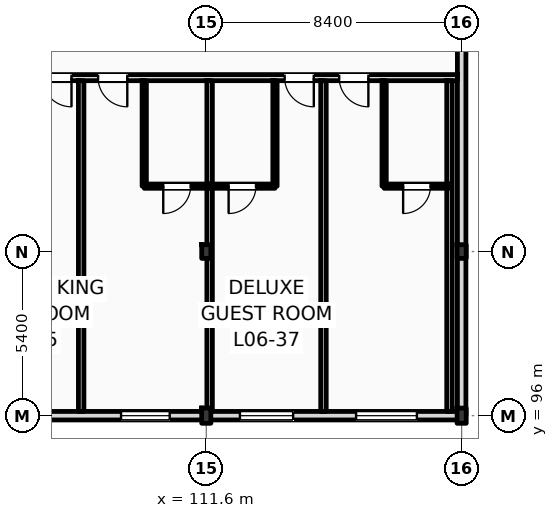
"""IFC4 building model, lengths in metres.
Left out: names, types, materials, properties, quantities, classifications, styles, units other than length and angle.
Written with IfcOpenShell. Run it as: python <this file> out.ifc"""

import sys

from ifc_helpers import new_model, si_unit, direction, frame, frame_2d, origin, origin_2d, place, context, subcontext, project, spatial, rectangle, i_section, extrude, element, fill, save


model = new_model("IFC4")
c1 = context("Model", 3, precision=1e-05, world=origin(), true_north=direction((0.0, 1.0)))
c2 = subcontext(c1, "Body", "Model", "MODEL_VIEW")
j1 = project(units=[si_unit("LENGTHUNIT", "METRE"), si_unit("PLANEANGLEUNIT", "RADIAN")], contexts=[c1])
p1 = place(None, origin())
s1 = spatial("IfcSite", under=j1, at=p1, CompositionType="ELEMENT")
p2 = place(p1, origin())
s2 = spatial("IfcBuilding", under=s1, at=p2, CompositionType="ELEMENT")
p3 = place(p2, frame((0.0, 0.0, 28.2)))
s3 = spatial("IfcBuildingStorey", under=s2, at=p3, CompositionType="ELEMENT", Elevation=28.2)
p4 = place(p3, frame((111.6, 96.0, 0.0), z_axis=(0.0, 0.0, 1.0), x_axis=(1.0, 0.0, 0.0)))
e1 = element("IfcColumn", 1, at=p4, inside=s3, PredefinedType="COLUMN", context=c2, shape_type="SweptSolid", body=[
    extrude(i_section(OverallWidth=0.3, OverallDepth=0.5, WebThickness=0.014, FlangeThickness=0.028, FilletRadius=0.027, at=origin_2d()), origin(), (0.0, 0.0, 1.0), 3.6),
])
p5 = place(p3, frame((111.6, 101.4, 0.0), z_axis=(0.0, 0.0, 1.0), x_axis=(1.0, 0.0, 0.0)))
e2 = element("IfcColumn", 2, at=p5, inside=s3, PredefinedType="COLUMN", context=c2, shape_type="SweptSolid", body=[
    extrude(i_section(OverallWidth=0.3, OverallDepth=0.45, WebThickness=0.014, FlangeThickness=0.026, FilletRadius=0.027, at=origin_2d()), origin(), (0.0, 0.0, 1.0), 3.6),
])
p6 = place(p3, frame((120.0, 96.0, 0.0), z_axis=(0.0, 0.0, 1.0), x_axis=(1.0, 0.0, 0.0)))
e3 = element("IfcColumn", 3, at=p6, inside=s3, PredefinedType="COLUMN", context=c2, shape_type="SweptSolid", body=[
    extrude(i_section(OverallWidth=0.3, OverallDepth=0.5, WebThickness=0.014, FlangeThickness=0.028, FilletRadius=0.027, at=origin_2d()), origin(), (0.0, 0.0, 1.0), 3.6),
])
p7 = place(p3, frame((120.0, 101.4, 0.0), z_axis=(0.0, 0.0, 1.0), x_axis=(1.0, 0.0, 0.0)))
e4 = element("IfcColumn", 4, at=p7, inside=s3, PredefinedType="COLUMN", context=c2, shape_type="SweptSolid", body=[
    extrude(i_section(OverallWidth=0.3, OverallDepth=0.45, WebThickness=0.014, FlangeThickness=0.026, FilletRadius=0.027, at=origin_2d()), origin(), (0.0, 0.0, 1.0), 3.6),
])
p8 = place(p3, frame((120.0, 96.0, 0.0), z_axis=(0.0, 0.0, 1.0), x_axis=(0.0, 1.0, 0.0)))
e5 = element("IfcWall", 5, at=p8, inside=s3, PredefinedType="STANDARD", context=c2, shape_type="SweptSolid", body=[
    extrude(rectangle(XDim=22.0, YDim=0.28, at=frame_2d((11.0, 0.0))), origin(), (0.0, 0.0, 1.0), 2.99),
])
p9 = place(p3, frame((25.2, 96.0, 0.0), z_axis=(0.0, 0.0, 1.0), x_axis=(1.0, 0.0, 0.0)))
e6 = element("IfcWall", 6, at=p9, inside=s3, PredefinedType="STANDARD", context=c2, shape_type="SweptSolid", body=[
    extrude(rectangle(XDim=94.8, YDim=0.28, at=frame_2d((47.4, 0.0))), origin(), (0.0, 0.0, 1.0), 2.8),
])
p10 = place(p9, frame((16.454, 0.0, 0.9)))
e7 = element("IfcOpeningElement", 7, at=p10, cuts=e6, PredefinedType="OPENING", context=c2, shape_type="SweptSolid", body=[
    extrude(rectangle(XDim=2.7, YDim=1.72, at=frame_2d((1.35, 0.86))), frame((0.0, 0.15, 0.0), z_axis=(0.0, -1.0, 0.0), x_axis=(1.0, 0.0, 0.0)), (0.0, 0.0, 1.0), 0.3),
])
p11 = place(p9, frame((20.068, 0.0, 0.9)))
e8 = element("IfcOpeningElement", 8, at=p11, cuts=e6, PredefinedType="OPENING", context=c2, shape_type="SweptSolid", body=[
    extrude(rectangle(XDim=2.389, YDim=1.72, at=frame_2d((1.194, 0.86))), frame((0.0, 0.15, 0.0), z_axis=(0.0, -1.0, 0.0), x_axis=(1.0, 0.0, 0.0)), (0.0, 0.0, 1.0), 0.3),
])
p12 = place(p9, frame((24.277, 0.0, 0.9)))
e9 = element("IfcOpeningElement", 9, at=p12, cuts=e6, PredefinedType="OPENING", context=c2, shape_type="SweptSolid", body=[
    extrude(rectangle(XDim=1.8, YDim=1.72, at=frame_2d((0.9, 0.86))), frame((0.0, 0.15, 0.0), z_axis=(0.0, -1.0, 0.0), x_axis=(1.0, 0.0, 0.0)), (0.0, 0.0, 1.0), 0.3),
])
p13 = place(p9, frame((27.885, 0.0, 0.9)))
e10 = element("IfcOpeningElement", 10, at=p13, cuts=e6, PredefinedType="OPENING", context=c2, shape_type="SweptSolid", body=[
    extrude(rectangle(XDim=2.388, YDim=1.72, at=frame_2d((1.194, 0.86))), frame((0.0, 0.15, 0.0), z_axis=(0.0, -1.0, 0.0), x_axis=(1.0, 0.0, 0.0)), (0.0, 0.0, 1.0), 0.3),
])
p14 = place(p9, frame((32.093, 0.0, 0.9)))
e11 = element("IfcOpeningElement", 11, at=p14, cuts=e6, PredefinedType="OPENING", context=c2, shape_type="SweptSolid", body=[
    extrude(rectangle(XDim=1.8, YDim=1.72, at=frame_2d((0.9, 0.86))), frame((0.0, 0.15, 0.0), z_axis=(0.0, -1.0, 0.0), x_axis=(1.0, 0.0, 0.0)), (0.0, 0.0, 1.0), 0.3),
])
p15 = place(p9, frame((35.702, 0.0, 0.9)))
e12 = element("IfcOpeningElement", 12, at=p15, cuts=e6, PredefinedType="OPENING", context=c2, shape_type="SweptSolid", body=[
    extrude(rectangle(XDim=2.488, YDim=1.72, at=frame_2d((1.244, 0.86))), frame((0.0, 0.15, 0.0), z_axis=(0.0, -1.0, 0.0), x_axis=(1.0, 0.0, 0.0)), (0.0, 0.0, 1.0), 0.3),
])
p16 = place(p9, frame((55.56, 0.0, 0.9)))
e13 = element("IfcOpeningElement", 13, at=p16, cuts=e6, PredefinedType="OPENING", context=c2, shape_type="SweptSolid", body=[
    extrude(rectangle(XDim=1.8, YDim=1.72, at=frame_2d((0.9, 0.86))), frame((0.0, 0.15, 0.0), z_axis=(0.0, -1.0, 0.0), x_axis=(1.0, 0.0, 0.0)), (0.0, 0.0, 1.0), 0.3),
])
p17 = place(p9, frame((58.985, 0.0, 0.9)))
e14 = element("IfcOpeningElement", 14, at=p17, cuts=e6, PredefinedType="OPENING", context=c2, shape_type="SweptSolid", body=[
    extrude(rectangle(XDim=1.8, YDim=1.72, at=frame_2d((0.9, 0.86))), frame((0.0, 0.15, 0.0), z_axis=(0.0, -1.0, 0.0), x_axis=(1.0, 0.0, 0.0)), (0.0, 0.0, 1.0), 0.3),
])
p18 = place(p9, frame((63.21, 0.0, 0.9)))
e15 = element("IfcOpeningElement", 15, at=p18, cuts=e6, PredefinedType="OPENING", context=c2, shape_type="SweptSolid", body=[
    extrude(rectangle(XDim=2.525, YDim=1.72, at=frame_2d((1.262, 0.86))), frame((0.0, 0.15, 0.0), z_axis=(0.0, -1.0, 0.0), x_axis=(1.0, 0.0, 0.0)), (0.0, 0.0, 1.0), 0.3),
])
p19 = place(p9, frame((66.955, 0.0, 0.9)))
e16 = element("IfcOpeningElement", 16, at=p19, cuts=e6, PredefinedType="OPENING", context=c2, shape_type="SweptSolid", body=[
    extrude(rectangle(XDim=1.8, YDim=1.72, at=frame_2d((0.9, 0.86))), frame((0.0, 0.15, 0.0), z_axis=(0.0, -1.0, 0.0), x_axis=(1.0, 0.0, 0.0)), (0.0, 0.0, 1.0), 0.3),
])
p20 = place(p9, frame((71.892, 0.0, 0.9)))
e17 = element("IfcOpeningElement", 17, at=p20, cuts=e6, PredefinedType="OPENING", context=c2, shape_type="SweptSolid", body=[
    extrude(rectangle(XDim=1.1, YDim=1.5, at=frame_2d((0.55, 0.75))), frame((0.0, 0.15, 0.0), z_axis=(0.0, -1.0, 0.0), x_axis=(1.0, 0.0, 0.0)), (0.0, 0.0, 1.0), 0.3),
])
p21 = place(p9, frame((75.802, 0.0, 0.9)))
e18 = element("IfcOpeningElement", 18, at=p21, cuts=e6, PredefinedType="OPENING", context=c2, shape_type="SweptSolid", body=[
    extrude(rectangle(XDim=1.25, YDim=1.6, at=frame_2d((0.625, 0.8))), frame((0.0, 0.15, 0.0), z_axis=(0.0, -1.0, 0.0), x_axis=(1.0, 0.0, 0.0)), (0.0, 0.0, 1.0), 0.3),
])
p22 = place(p9, frame((79.712, 0.0, 0.9)))
e19 = element("IfcOpeningElement", 19, at=p22, cuts=e6, PredefinedType="OPENING", context=c2, shape_type="SweptSolid", body=[
    extrude(rectangle(XDim=1.4, YDim=1.7, at=frame_2d((0.7, 0.85))), frame((0.0, 0.15, 0.0), z_axis=(0.0, -1.0, 0.0), x_axis=(1.0, 0.0, 0.0)), (0.0, 0.0, 1.0), 0.3),
])
p23 = place(p9, frame((83.597, 0.0, 0.9)))
e20 = element("IfcOpeningElement", 20, at=p23, cuts=e6, PredefinedType="OPENING", context=c2, shape_type="SweptSolid", body=[
    extrude(rectangle(XDim=1.6, YDim=1.72, at=frame_2d((0.8, 0.86))), frame((0.0, 0.15, 0.0), z_axis=(0.0, -1.0, 0.0), x_axis=(1.0, 0.0, 0.0)), (0.0, 0.0, 1.0), 0.3),
])
p24 = place(p9, frame((87.507, 0.0, 0.9)))
e21 = element("IfcOpeningElement", 21, at=p24, cuts=e6, PredefinedType="OPENING", context=c2, shape_type="SweptSolid", body=[
    extrude(rectangle(XDim=1.75, YDim=1.72, at=frame_2d((0.875, 0.86))), frame((0.0, 0.15, 0.0), z_axis=(0.0, -1.0, 0.0), x_axis=(1.0, 0.0, 0.0)), (0.0, 0.0, 1.0), 0.3),
])
p25 = place(p9, frame((91.328, 0.0, 0.9)))
e22 = element("IfcOpeningElement", 22, at=p25, cuts=e6, PredefinedType="OPENING", context=c2, shape_type="SweptSolid", body=[
    extrude(rectangle(XDim=2.0, YDim=1.72, at=frame_2d((1.0, 0.86))), frame((0.0, 0.15, 0.0), z_axis=(0.0, -1.0, 0.0), x_axis=(1.0, 0.0, 0.0)), (0.0, 0.0, 1.0), 0.3),
])
p26 = place(p3, frame((79.76, 107.12, 0.0), z_axis=(0.0, 0.0, 1.0), x_axis=(1.0, 0.0, 0.0)))
e23 = element("IfcWall", 23, at=p26, inside=s3, PredefinedType="PARTITIONING", context=c2, shape_type="SweptSolid", body=[
    extrude(rectangle(XDim=40.1, YDim=0.2, at=frame_2d((20.05, 0.0))), origin(), (0.0, 0.0, 1.0), 3.36),
])
p27 = place(p26, frame((2.497, 0.0, 0.0)))
e24 = element("IfcOpeningElement", 24, at=p27, cuts=e23, PredefinedType="OPENING", context=c2, shape_type="SweptSolid", body=[
    extrude(rectangle(XDim=0.96, YDim=2.2, at=frame_2d((0.48, 1.1))), frame((0.0, 0.11, 0.0), z_axis=(0.0, -1.0, 0.0), x_axis=(1.0, 0.0, 0.0)), (0.0, 0.0, 1.0), 0.22),
])
p28 = place(p26, frame((4.372, 0.0, 0.0)))
e25 = element("IfcOpeningElement", 25, at=p28, cuts=e23, PredefinedType="OPENING", context=c2, shape_type="SweptSolid", body=[
    extrude(rectangle(XDim=0.96, YDim=2.2, at=frame_2d((0.48, 1.1))), frame((0.0, 0.11, 0.0), z_axis=(0.0, -1.0, 0.0), x_axis=(1.0, 0.0, 0.0)), (0.0, 0.0, 1.0), 0.22),
])
p29 = place(p26, frame((10.507, 0.0, 0.0)))
e26 = element("IfcOpeningElement", 26, at=p29, cuts=e23, PredefinedType="OPENING", context=c2, shape_type="SweptSolid", body=[
    extrude(rectangle(XDim=0.96, YDim=2.2, at=frame_2d((0.48, 1.1))), frame((0.0, 0.11, 0.0), z_axis=(0.0, -1.0, 0.0), x_axis=(1.0, 0.0, 0.0)), (0.0, 0.0, 1.0), 0.22),
])
p30 = place(p26, frame((12.342, 0.0, 0.0)))
e27 = element("IfcOpeningElement", 27, at=p30, cuts=e23, PredefinedType="OPENING", context=c2, shape_type="SweptSolid", body=[
    extrude(rectangle(XDim=0.96, YDim=2.2, at=frame_2d((0.48, 1.1))), frame((0.0, 0.11, 0.0), z_axis=(0.0, -1.0, 0.0), x_axis=(1.0, 0.0, 0.0)), (0.0, 0.0, 1.0), 0.22),
])
p31 = place(p26, frame((18.477, 0.0, 0.0)))
e28 = element("IfcOpeningElement", 28, at=p31, cuts=e23, PredefinedType="OPENING", context=c2, shape_type="SweptSolid", body=[
    extrude(rectangle(XDim=0.96, YDim=2.2, at=frame_2d((0.48, 1.1))), frame((0.0, 0.11, 0.0), z_axis=(0.0, -1.0, 0.0), x_axis=(1.0, 0.0, 0.0)), (0.0, 0.0, 1.0), 0.22),
])
p32 = place(p26, frame((20.312, 0.0, 0.0)))
e29 = element("IfcOpeningElement", 29, at=p32, cuts=e23, PredefinedType="OPENING", context=c2, shape_type="SweptSolid", body=[
    extrude(rectangle(XDim=0.96, YDim=2.2, at=frame_2d((0.48, 1.1))), frame((0.0, 0.11, 0.0), z_axis=(0.0, -1.0, 0.0), x_axis=(1.0, 0.0, 0.0)), (0.0, 0.0, 1.0), 0.22),
])
p33 = place(p26, frame((26.447, 0.0, 0.0)))
e30 = element("IfcOpeningElement", 30, at=p33, cuts=e23, PredefinedType="OPENING", context=c2, shape_type="SweptSolid", body=[
    extrude(rectangle(XDim=0.96, YDim=2.2, at=frame_2d((0.48, 1.1))), frame((0.0, 0.11, 0.0), z_axis=(0.0, -1.0, 0.0), x_axis=(1.0, 0.0, 0.0)), (0.0, 0.0, 1.0), 0.22),
])
p34 = place(p26, frame((28.282, 0.0, 0.0)))
e31 = element("IfcOpeningElement", 31, at=p34, cuts=e23, PredefinedType="OPENING", context=c2, shape_type="SweptSolid", body=[
    extrude(rectangle(XDim=0.96, YDim=2.2, at=frame_2d((0.48, 1.1))), frame((0.0, 0.11, 0.0), z_axis=(0.0, -1.0, 0.0), x_axis=(1.0, 0.0, 0.0)), (0.0, 0.0, 1.0), 0.22),
])
p35 = place(p26, frame((34.417, 0.0, 0.0)))
e32 = element("IfcOpeningElement", 32, at=p35, cuts=e23, PredefinedType="OPENING", context=c2, shape_type="SweptSolid", body=[
    extrude(rectangle(XDim=0.96, YDim=2.2, at=frame_2d((0.48, 1.1))), frame((0.0, 0.11, 0.0), z_axis=(0.0, -1.0, 0.0), x_axis=(1.0, 0.0, 0.0)), (0.0, 0.0, 1.0), 0.22),
])
p36 = place(p26, frame((36.212, 0.0, 0.0)))
e33 = element("IfcOpeningElement", 33, at=p36, cuts=e23, PredefinedType="OPENING", context=c2, shape_type="SweptSolid", body=[
    extrude(rectangle(XDim=0.96, YDim=2.2, at=frame_2d((0.48, 1.1))), frame((0.0, 0.11, 0.0), z_axis=(0.0, -1.0, 0.0), x_axis=(1.0, 0.0, 0.0)), (0.0, 0.0, 1.0), 0.22),
])
p37 = place(p3, frame((107.485, 96.14, 0.0), z_axis=(0.0, 0.0, 1.0), x_axis=(0.0, 1.0, 0.0)))
e34 = element("IfcWall", 34, at=p37, inside=s3, PredefinedType="PARTITIONING", context=c2, shape_type="SweptSolid", body=[
    extrude(rectangle(XDim=10.88, YDim=0.18, at=frame_2d((5.44, 0.0))), origin(), (0.0, 0.0, 1.0), 3.36),
])
p38 = place(p3, frame((111.71, 96.14, 0.0), z_axis=(0.0, 0.0, 1.0), x_axis=(0.0, 1.0, 0.0)))
e35 = element("IfcWall", 35, at=p38, inside=s3, PredefinedType="PARTITIONING", context=c2, shape_type="SweptSolid", body=[
    extrude(rectangle(XDim=10.88, YDim=0.18, at=frame_2d((5.44, 0.0))), origin(), (0.0, 0.0, 1.0), 2.99),
])
p39 = place(p3, frame((109.56, 103.55, 0.0), z_axis=(0.0, 0.0, 1.0), x_axis=(0.0, 1.0, 0.0)))
e36 = element("IfcWall", 36, at=p39, inside=s3, PredefinedType="PARTITIONING", context=c2, shape_type="SweptSolid", body=[
    extrude(rectangle(XDim=3.47, YDim=0.14, at=frame_2d((1.735, 0.0))), origin(), (0.0, 0.0, 1.0), 3.36),
])
p40 = place(p3, frame((109.56, 103.55, 0.0), z_axis=(0.0, 0.0, 1.0), x_axis=(1.0, 0.0, 0.0)))
e37 = element("IfcWall", 37, at=p40, inside=s3, PredefinedType="PARTITIONING", context=c2, shape_type="SweptSolid", body=[
    extrude(rectangle(XDim=2.15, YDim=0.14, at=frame_2d((1.075, 0.0))), origin(), (0.0, 0.0, 1.0), 3.36),
])
p41 = place(p40, frame((0.625, 0.0, 0.0)))
e38 = element("IfcOpeningElement", 38, at=p41, cuts=e37, PredefinedType="OPENING", context=c2, shape_type="SweptSolid", body=[
    extrude(rectangle(XDim=0.9, YDim=2.1, at=frame_2d((0.45, 1.05))), frame((0.0, 0.08, 0.0), z_axis=(0.0, -1.0, 0.0), x_axis=(1.0, 0.0, 0.0)), (0.0, 0.0, 1.0), 0.16),
])
p42 = place(p3, frame((115.455, 96.14, 0.0), z_axis=(0.0, 0.0, 1.0), x_axis=(0.0, 1.0, 0.0)))
e39 = element("IfcWall", 39, at=p42, inside=s3, PredefinedType="PARTITIONING", context=c2, shape_type="SweptSolid", body=[
    extrude(rectangle(XDim=10.88, YDim=0.18, at=frame_2d((5.44, 0.0))), origin(), (0.0, 0.0, 1.0), 3.36),
])
p43 = place(p3, frame((113.86, 103.55, 0.0), z_axis=(0.0, 0.0, 1.0), x_axis=(0.0, 1.0, 0.0)))
e40 = element("IfcWall", 40, at=p43, inside=s3, PredefinedType="PARTITIONING", context=c2, shape_type="SweptSolid", body=[
    extrude(rectangle(XDim=3.47, YDim=0.14, at=frame_2d((1.735, 0.0))), origin(), (0.0, 0.0, 1.0), 3.36),
])
p44 = place(p3, frame((111.71, 103.55, 0.0), z_axis=(0.0, 0.0, 1.0), x_axis=(1.0, 0.0, 0.0)))
e41 = element("IfcWall", 41, at=p44, inside=s3, PredefinedType="PARTITIONING", context=c2, shape_type="SweptSolid", body=[
    extrude(rectangle(XDim=2.15, YDim=0.14, at=frame_2d((1.075, 0.0))), origin(), (0.0, 0.0, 1.0), 3.36),
])
p45 = place(p44, frame((0.625, 0.0, 0.0)))
e42 = element("IfcOpeningElement", 42, at=p45, cuts=e41, PredefinedType="OPENING", context=c2, shape_type="SweptSolid", body=[
    extrude(rectangle(XDim=0.9, YDim=2.1, at=frame_2d((0.45, 1.05))), frame((0.0, 0.08, 0.0), z_axis=(0.0, -1.0, 0.0), x_axis=(1.0, 0.0, 0.0)), (0.0, 0.0, 1.0), 0.16),
])
p46 = place(p3, frame((119.6, 96.14, 0.0), z_axis=(0.0, 0.0, 1.0), x_axis=(0.0, 1.0, 0.0)))
e43 = element("IfcWall", 43, at=p46, inside=s3, PredefinedType="PARTITIONING", context=c2, shape_type="SweptSolid", body=[
    extrude(rectangle(XDim=10.88, YDim=0.18, at=frame_2d((5.44, 0.0))), origin(), (0.0, 0.0, 1.0), 3.36),
])
p47 = place(p3, frame((117.45, 103.55, 0.0), z_axis=(0.0, 0.0, 1.0), x_axis=(0.0, 1.0, 0.0)))
e44 = element("IfcWall", 44, at=p47, inside=s3, PredefinedType="PARTITIONING", context=c2, shape_type="SweptSolid", body=[
    extrude(rectangle(XDim=3.47, YDim=0.14, at=frame_2d((1.735, 0.0))), origin(), (0.0, 0.0, 1.0), 3.36),
])
p48 = place(p3, frame((117.45, 103.55, 0.0), z_axis=(0.0, 0.0, 1.0), x_axis=(1.0, 0.0, 0.0)))
e45 = element("IfcWall", 45, at=p48, inside=s3, PredefinedType="PARTITIONING", context=c2, shape_type="SweptSolid", body=[
    extrude(rectangle(XDim=2.15, YDim=0.14, at=frame_2d((1.075, 0.0))), origin(), (0.0, 0.0, 1.0), 3.36),
])
p49 = place(p48, frame((0.625, 0.0, 0.0)))
e46 = element("IfcOpeningElement", 46, at=p49, cuts=e45, PredefinedType="OPENING", context=c2, shape_type="SweptSolid", body=[
    extrude(rectangle(XDim=0.9, YDim=2.1, at=frame_2d((0.45, 1.05))), frame((0.0, 0.08, 0.0), z_axis=(0.0, -1.0, 0.0), x_axis=(1.0, 0.0, 0.0)), (0.0, 0.0, 1.0), 0.16),
])
p50 = place(p23, origin())
e47 = element("IfcWindow", 47, at=p50, inside=s3, PartitioningType="DOUBLE_PANEL_VERTICAL", PredefinedType="WINDOW", context=c2, shape_type="SweptSolid", body=[
    extrude(rectangle(XDim=1.6, YDim=1.72, at=frame_2d((0.8, 0.86))), frame((0.0, 0.03, 0.0), z_axis=(0.0, -1.0, 0.0), x_axis=(1.0, 0.0, 0.0)), (0.0, 0.0, 1.0), 0.06),
])
fill(e20, e47)
p51 = place(p24, origin())
e48 = element("IfcWindow", 48, at=p51, inside=s3, PartitioningType="DOUBLE_PANEL_VERTICAL", PredefinedType="WINDOW", context=c2, shape_type="SweptSolid", body=[
    extrude(rectangle(XDim=1.75, YDim=1.72, at=frame_2d((0.875, 0.86))), frame((0.0, 0.03, 0.0), z_axis=(0.0, -1.0, 0.0), x_axis=(1.0, 0.0, 0.0)), (0.0, 0.0, 1.0), 0.06),
])
fill(e21, e48)
p52 = place(p25, origin())
e49 = element("IfcWindow", 49, at=p52, inside=s3, PartitioningType="DOUBLE_PANEL_VERTICAL", PredefinedType="WINDOW", context=c2, shape_type="SweptSolid", body=[
    extrude(rectangle(XDim=2.0, YDim=1.72, at=frame_2d((1.0, 0.86))), frame((0.0, 0.03, 0.0), z_axis=(0.0, -1.0, 0.0), x_axis=(1.0, 0.0, 0.0)), (0.0, 0.0, 1.0), 0.06),
])
fill(e22, e49)
p53 = place(p33, frame((0.96, 0.0, 0.0), z_axis=(0.0, 0.0, 1.0), x_axis=(-1.0, 0.0, 0.0)))
e50 = element("IfcDoor", 50, at=p53, inside=s3, OperationType="SINGLE_SWING_RIGHT", PredefinedType="DOOR", context=c2, shape_type="SweptSolid", body=[
    extrude(rectangle(XDim=0.96, YDim=2.2, at=frame_2d((0.48, 1.1))), frame((0.0, 0.025, 0.0), z_axis=(0.0, -1.0, 0.0), x_axis=(1.0, 0.0, 0.0)), (0.0, 0.0, 1.0), 0.05),
])
fill(e30, e50)
p54 = place(p34, frame((0.96, 0.0, 0.0), z_axis=(0.0, 0.0, 1.0), x_axis=(-1.0, 0.0, 0.0)))
e51 = element("IfcDoor", 51, at=p54, inside=s3, OperationType="SINGLE_SWING_RIGHT", PredefinedType="DOOR", context=c2, shape_type="SweptSolid", body=[
    extrude(rectangle(XDim=0.96, YDim=2.2, at=frame_2d((0.48, 1.1))), frame((0.0, 0.025, 0.0), z_axis=(0.0, -1.0, 0.0), x_axis=(1.0, 0.0, 0.0)), (0.0, 0.0, 1.0), 0.05),
])
fill(e31, e51)
p55 = place(p41, frame((0.9, 0.0, 0.0), z_axis=(0.0, 0.0, 1.0), x_axis=(-1.0, 0.0, 0.0)))
e52 = element("IfcDoor", 52, at=p55, inside=s3, OperationType="SINGLE_SWING_LEFT", PredefinedType="DOOR", context=c2, shape_type="SweptSolid", body=[
    extrude(rectangle(XDim=0.9, YDim=2.1, at=frame_2d((0.45, 1.05))), frame((0.0, 0.025, 0.0), z_axis=(0.0, -1.0, 0.0), x_axis=(1.0, 0.0, 0.0)), (0.0, 0.0, 1.0), 0.05),
])
fill(e38, e52)
p56 = place(p35, frame((0.96, 0.0, 0.0), z_axis=(0.0, 0.0, 1.0), x_axis=(-1.0, 0.0, 0.0)))
e53 = element("IfcDoor", 53, at=p56, inside=s3, OperationType="SINGLE_SWING_RIGHT", PredefinedType="DOOR", context=c2, shape_type="SweptSolid", body=[
    extrude(rectangle(XDim=0.96, YDim=2.2, at=frame_2d((0.48, 1.1))), frame((0.0, 0.025, 0.0), z_axis=(0.0, -1.0, 0.0), x_axis=(1.0, 0.0, 0.0)), (0.0, 0.0, 1.0), 0.05),
])
fill(e32, e53)
p57 = place(p45, frame((0.9, 0.0, 0.0), z_axis=(0.0, 0.0, 1.0), x_axis=(-1.0, 0.0, 0.0)))
e54 = element("IfcDoor", 54, at=p57, inside=s3, OperationType="SINGLE_SWING_LEFT", PredefinedType="DOOR", context=c2, shape_type="SweptSolid", body=[
    extrude(rectangle(XDim=0.9, YDim=2.1, at=frame_2d((0.45, 1.05))), frame((0.0, 0.025, 0.0), z_axis=(0.0, -1.0, 0.0), x_axis=(1.0, 0.0, 0.0)), (0.0, 0.0, 1.0), 0.05),
])
fill(e42, e54)
p58 = place(p36, frame((0.96, 0.0, 0.0), z_axis=(0.0, 0.0, 1.0), x_axis=(-1.0, 0.0, 0.0)))
e55 = element("IfcDoor", 55, at=p58, inside=s3, OperationType="SINGLE_SWING_RIGHT", PredefinedType="DOOR", context=c2, shape_type="SweptSolid", body=[
    extrude(rectangle(XDim=0.96, YDim=2.2, at=frame_2d((0.48, 1.1))), frame((0.0, 0.025, 0.0), z_axis=(0.0, -1.0, 0.0), x_axis=(1.0, 0.0, 0.0)), (0.0, 0.0, 1.0), 0.05),
])
fill(e33, e55)
p59 = place(p49, frame((0.9, 0.0, 0.0), z_axis=(0.0, 0.0, 1.0), x_axis=(-1.0, 0.0, 0.0)))
e56 = element("IfcDoor", 56, at=p59, inside=s3, OperationType="SINGLE_SWING_LEFT", PredefinedType="DOOR", context=c2, shape_type="SweptSolid", body=[
    extrude(rectangle(XDim=0.9, YDim=2.1, at=frame_2d((0.45, 1.05))), frame((0.0, 0.025, 0.0), z_axis=(0.0, -1.0, 0.0), x_axis=(1.0, 0.0, 0.0)), (0.0, 0.0, 1.0), 0.05),
])
fill(e46, e56)
save(model, sys.argv[1])
